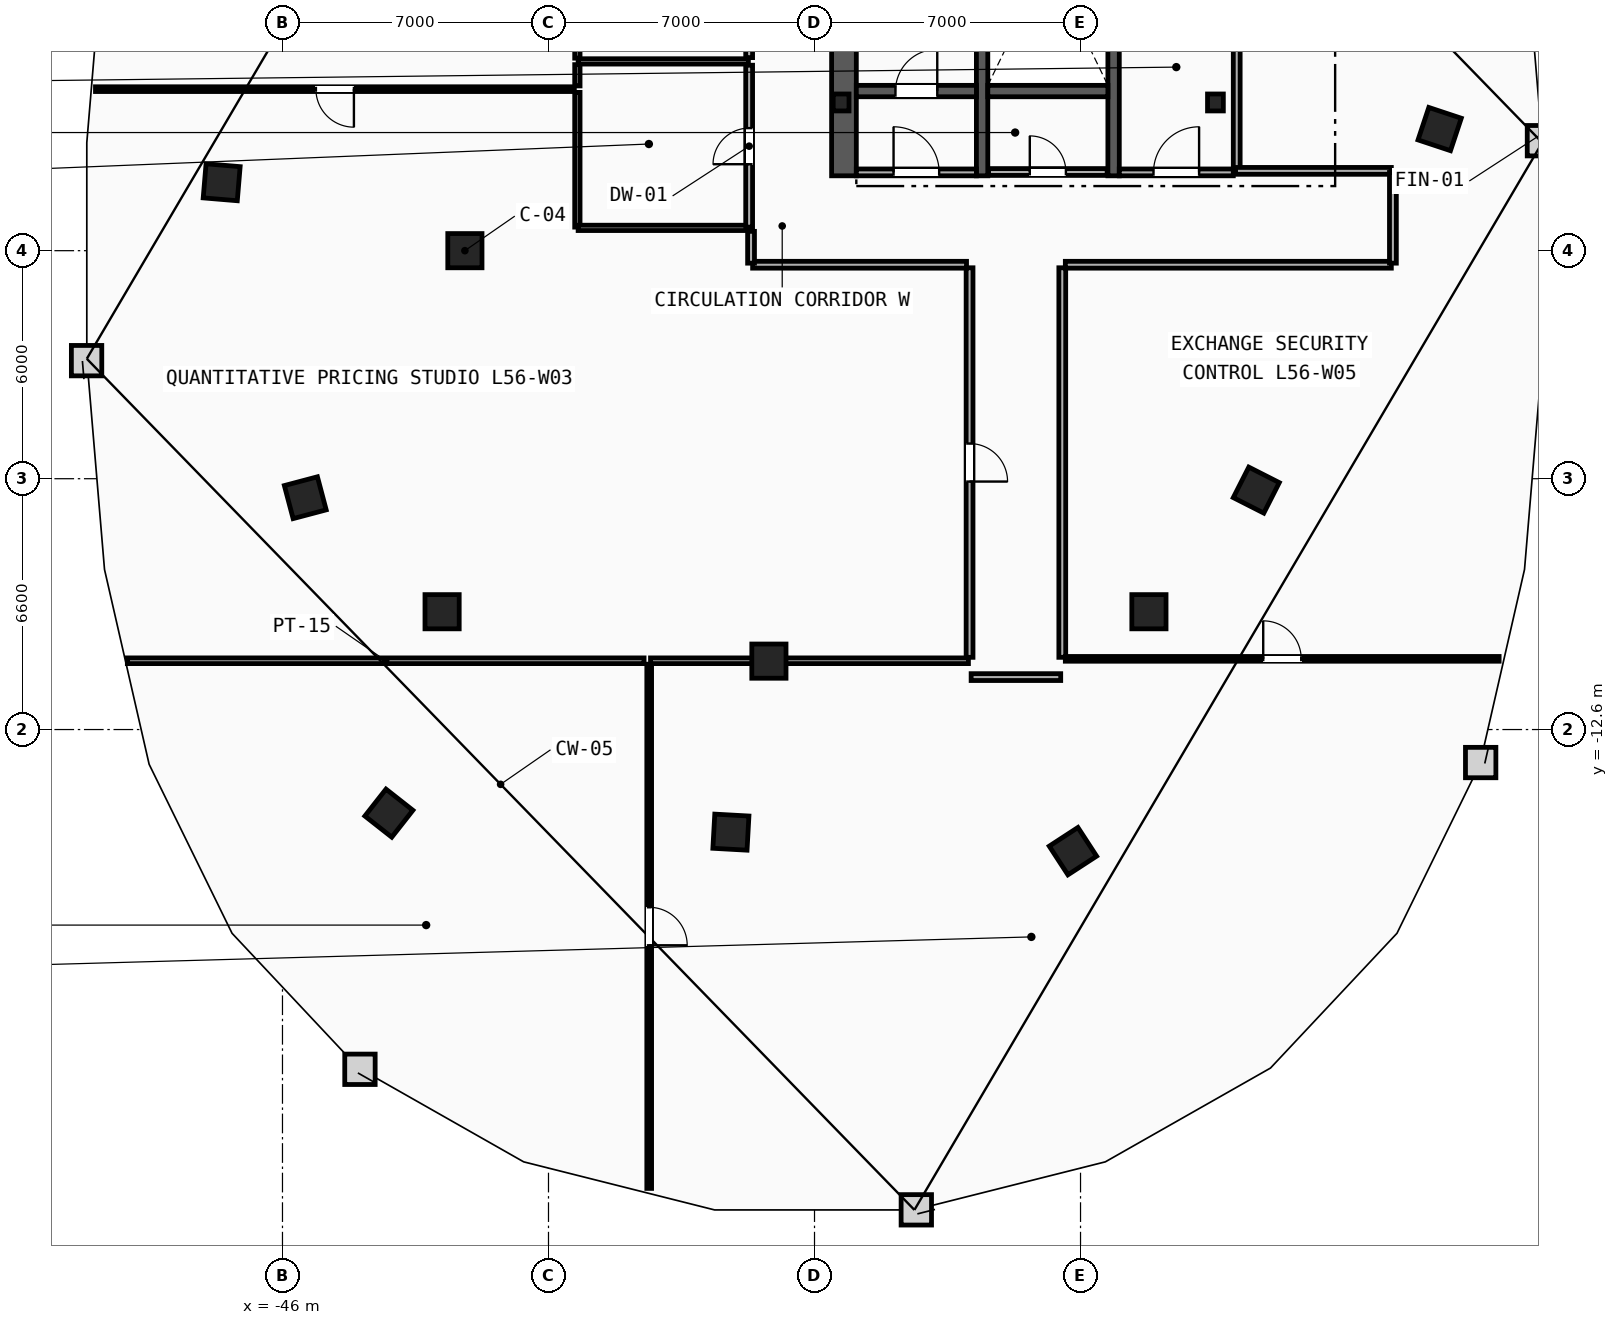
"""IFC4 building model, lengths in metres.
Left out: names, types, materials, properties, quantities, classifications, styles, units other than length and angle.
Written with IfcOpenShell. Run it as: python <this file> out.ifc"""

import sys

from ifc_helpers import new_model, si_unit, direction, frame, frame_2d, origin, origin_2d, place, context, subcontext, project, spatial, rectangle, i_section, extrude, element, fill, save


model = new_model("IFC4")
c1 = context("Model", 3, precision=1e-05, world=origin(), true_north=direction((0.0, 1.0)))
c2 = subcontext(c1, "Body", "Model", "MODEL_VIEW")
j1 = project(units=[si_unit("LENGTHUNIT", "METRE"), si_unit("PLANEANGLEUNIT", "RADIAN")], contexts=[c1])
p1 = place(None, origin())
s1 = spatial("IfcSite", under=j1, at=p1, CompositionType="ELEMENT")
p2 = place(p1, origin())
s2 = spatial("IfcBuilding", under=s1, at=p2, CompositionType="ELEMENT")
p3 = place(p2, frame((0.0, 0.0, 213.4)))
s3 = spatial("IfcBuildingStorey", under=s2, at=p3, CompositionType="ELEMENT", Elevation=213.4)
for number, where, z_axis, x_axis in (
    (1, (-31.3, 3.9, 0.0), (0.0, 0.0, 1.0), (1.0, 0.0, 0.0)),
    (2, (-21.45, 3.9, 0.0), (0.0, 0.0, 1.0), (1.0, 0.0, 0.0)),
):
    element("IfcColumn", number, at=place(p3, frame(where, z_axis=z_axis, x_axis=x_axis)), inside=s3, PredefinedType="COLUMN", context=c2, shape_type="SweptSolid", body=[
        extrude(i_section(OverallWidth=0.416, OverallDepth=0.446, WebThickness=0.039, FlangeThickness=0.063, FilletRadius=0.018, at=origin_2d()), origin(), (0.0, 0.0, 1.0), 3.6),
    ])
for number, where, z_axis, x_axis in (
    (3, (-41.2, 0.0, 0.0), (0.0, 0.0, 1.0), (1.0, 0.0, 0.0)),
    (4, (-41.8, -9.5, 0.0), (0.0, 0.0, 1.0), (1.0, 0.0, 0.0)),
    (5, (-33.2, -10.8, 0.0), (0.0, 0.0, 1.0), (1.0, 0.0, 0.0)),
    (6, (-23.2, -9.5, 0.0), (0.0, 0.0, 1.0), (1.0, 0.0, 0.0)),
    (7, (-15.55, 3.2, 0.0), (0.0, 0.0, 1.0), (0.315, 0.949, 0.0)),
    (8, (-47.6, 1.8, 0.0), (0.0, 0.0, 1.0), (-0.084, -0.997, 0.0)),
    (9, (-45.4, -6.5, 0.0), (0.0, 0.0, 1.0), (0.256, -0.967, 0.0)),
    (10, (-43.2, -14.8, 0.0), (0.0, 0.0, 1.0), (0.786, -0.618, 0.0)),
    (11, (-34.2, -15.3, 0.0), (0.0, 0.0, 1.0), (0.998, -0.055, 0.0)),
    (12, (-25.2, -15.8, 0.0), (0.0, 0.0, 1.0), (0.838, 0.546, 0.0)),
    (13, (-20.375, -6.3, 0.0), (0.0, 0.0, 1.0), (0.453, 0.892, 0.0)),
):
    element("IfcColumn", number, at=place(p3, frame(where, z_axis=z_axis, x_axis=x_axis)), inside=s3, PredefinedType="COLUMN", context=c2, shape_type="SweptSolid", body=[
        extrude(rectangle(XDim=0.9, YDim=0.9, at=origin_2d()), origin(), (0.0, 0.0, 1.0), 3.6),
    ])
p4 = place(p3, frame((-31.225, 1.97, 0.0), z_axis=(0.0, 0.0, 1.0), x_axis=(0.0, 1.0, 0.0)))
e14 = element("IfcWall", 14, at=p4, inside=s3, PredefinedType="SHEAR", context=c2, shape_type="SweptSolid", body=[
    extrude(rectangle(XDim=13.33, YDim=0.65, at=frame_2d((6.665, 0.0))), origin(), (0.0, 0.0, 1.0), 3.34),
])
for number, where, z_axis, x_axis in (
    (15, (-27.59, 1.97, 0.0), (0.0, 0.0, 1.0), (0.0, 1.0, 0.0)),
    (16, (-24.13, 1.97, 0.0), (0.0, 0.0, 1.0), (0.0, 1.0, 0.0)),
):
    element("IfcWall", number, at=place(p3, frame(where, z_axis=z_axis, x_axis=x_axis)), inside=s3, PredefinedType="SHEAR", context=c2, shape_type="SweptSolid", body=[
        extrude(rectangle(XDim=10.68, YDim=0.3, at=frame_2d((5.34, 0.0))), origin(), (0.0, 0.0, 1.0), 3.34),
    ])
p5 = place(p3, frame((-30.9, 4.2, 0.0), z_axis=(0.0, 0.0, 1.0), x_axis=(1.0, 0.0, 0.0)))
e17 = element("IfcWall", 17, at=p5, inside=s3, PredefinedType="SHEAR", context=c2, shape_type="SweptSolid", body=[
    extrude(rectangle(XDim=3.16, YDim=0.3, at=frame_2d((1.58, 0.0))), origin(), (0.0, 0.0, 1.0), 3.34),
])
p6 = place(p5, frame((1.03, 0.0, 0.0)))
e18 = element("IfcOpeningElement", 18, at=p6, cuts=e17, PredefinedType="OPENING", context=c2, shape_type="SweptSolid", body=[
    extrude(rectangle(XDim=1.1, YDim=2.15, at=frame_2d((0.55, 1.075))), frame((0.0, 0.16, 0.0), z_axis=(0.0, -1.0, 0.0), x_axis=(1.0, 0.0, 0.0)), (0.0, 0.0, 1.0), 0.32),
])
p7 = place(p3, frame((-27.44, 4.2, 0.0), z_axis=(0.0, 0.0, 1.0), x_axis=(1.0, 0.0, 0.0)))
e19 = element("IfcWall", 19, at=p7, inside=s3, PredefinedType="SHEAR", context=c2, shape_type="SweptSolid", body=[
    extrude(rectangle(XDim=3.16, YDim=0.3, at=frame_2d((1.58, 0.0))), origin(), (0.0, 0.0, 1.0), 3.34),
])
p8 = place(p3, frame((-20.89, 2.15, 0.0), z_axis=(0.0, 0.0, 1.0), x_axis=(0.0, 1.0, 0.0)))
e20 = element("IfcWall", 20, at=p8, inside=s3, PredefinedType="PARTITIONING", context=c2, shape_type="SweptSolid", body=[
    extrude(rectangle(XDim=5.3, YDim=0.18, at=frame_2d((2.65, 0.0))), origin(), (0.0, 0.0, 1.0), 3.34),
])
p9 = place(p3, frame((-23.98, 2.06, 0.0), z_axis=(0.0, 0.0, 1.0), x_axis=(1.0, 0.0, 0.0)))
e21 = element("IfcWall", 21, at=p9, inside=s3, PredefinedType="PARTITIONING", context=c2, shape_type="SweptSolid", body=[
    extrude(rectangle(XDim=3.0, YDim=0.18, at=frame_2d((1.5, 0.0))), origin(), (0.0, 0.0, 1.0), 3.34),
])
p10 = place(p9, frame((0.9, 0.0, 0.0)))
e22 = element("IfcOpeningElement", 22, at=p10, cuts=e21, PredefinedType="OPENING", context=c2, shape_type="SweptSolid", body=[
    extrude(rectangle(XDim=1.2, YDim=2.15, at=frame_2d((0.6, 1.075))), frame((0.0, 0.1, 0.0), z_axis=(0.0, -1.0, 0.0), x_axis=(1.0, 0.0, 0.0)), (0.0, 0.0, 1.0), 0.2),
])
p11 = place(p3, frame((-30.9, 2.06, 0.0), z_axis=(0.0, 0.0, 1.0), x_axis=(1.0, 0.0, 0.0)))
e23 = element("IfcWall", 23, at=p11, inside=s3, PredefinedType="PARTITIONING", context=c2, shape_type="SweptSolid", body=[
    extrude(rectangle(XDim=3.16, YDim=0.18, at=frame_2d((1.58, 0.0))), origin(), (0.0, 0.0, 1.0), 3.34),
])
p12 = place(p11, frame((0.98, 0.0, 0.0)))
e24 = element("IfcOpeningElement", 24, at=p12, cuts=e23, PredefinedType="OPENING", context=c2, shape_type="SweptSolid", body=[
    extrude(rectangle(XDim=1.2, YDim=2.15, at=frame_2d((0.6, 1.075))), frame((0.0, 0.1, 0.0), z_axis=(0.0, -1.0, 0.0), x_axis=(1.0, 0.0, 0.0)), (0.0, 0.0, 1.0), 0.2),
])
p13 = place(p3, frame((-27.42, 2.07, 0.0), z_axis=(0.0, 0.0, 1.0), x_axis=(1.0, 0.0, 0.0)))
e25 = element("IfcWall", 25, at=p13, inside=s3, PredefinedType="PARTITIONING", context=c2, shape_type="SweptSolid", body=[
    extrude(rectangle(XDim=3.12, YDim=0.18, at=frame_2d((1.56, 0.0))), origin(), (0.0, 0.0, 1.0), 3.34),
])
p14 = place(p13, frame((1.085, 0.0, 0.0)))
e26 = element("IfcOpeningElement", 26, at=p14, cuts=e25, PredefinedType="OPENING", context=c2, shape_type="SweptSolid", body=[
    extrude(rectangle(XDim=0.95, YDim=2.1, at=frame_2d((0.475, 1.05))), frame((0.0, 0.1, 0.0), z_axis=(0.0, -1.0, 0.0), x_axis=(1.0, 0.0, 0.0)), (0.0, 0.0, 1.0), 0.2),
])
p15 = place(p3, frame((-38.24, 0.62, 0.0), z_axis=(0.0, 0.0, 1.0), x_axis=(0.0, 1.0, 0.0)))
e27 = element("IfcWall", 27, at=p15, inside=s3, PredefinedType="PARTITIONING", context=c2, shape_type="SweptSolid", body=[
    extrude(rectangle(XDim=3.545, YDim=0.14, at=frame_2d((1.772, 0.0))), origin(), (0.0, 0.0, 1.0), 3.34),
])
p16 = place(p3, frame((-38.24, 4.335, 0.0), z_axis=(0.0, 0.0, 1.0), x_axis=(0.0, 1.0, 0.0)))
e28 = element("IfcWall", 28, at=p16, inside=s3, PredefinedType="PARTITIONING", context=c2, shape_type="SweptSolid", body=[
    extrude(rectangle(XDim=0.56, YDim=0.14, at=frame_2d((0.28, 0.0))), origin(), (0.0, 0.0, 1.0), 3.34),
])
p17 = place(p3, frame((-38.24, 5.065, 0.0), z_axis=(0.0, 0.0, 1.0), x_axis=(0.0, 1.0, 0.0)))
e29 = element("IfcWall", 29, at=p17, inside=s3, PredefinedType="PARTITIONING", context=c2, shape_type="SweptSolid", body=[
    extrude(rectangle(XDim=4.175, YDim=0.14, at=frame_2d((2.087, 0.0))), origin(), (0.0, 0.0, 1.0), 3.34),
])
for number, where, z_axis, x_axis in (
    (30, (-38.22, 0.6, 0.0), (0.0, 0.0, 1.0), (1.0, 0.0, 0.0)),
    (31, (-38.22, 4.98, 0.0), (0.0, 0.0, 1.0), (1.0, 0.0, 0.0)),
):
    element("IfcWall", number, at=place(p3, frame(where, z_axis=z_axis, x_axis=x_axis)), inside=s3, PredefinedType="PARTITIONING", context=c2, shape_type="SweptSolid", body=[
        extrude(rectangle(XDim=4.48, YDim=0.14, at=frame_2d((2.24, 0.0))), origin(), (0.0, 0.0, 1.0), 3.34),
    ])
p18 = place(p3, frame((-33.72, 0.62, 0.0), z_axis=(0.0, 0.0, 1.0), x_axis=(0.0, 1.0, 0.0)))
e32 = element("IfcWall", 32, at=p18, inside=s3, PredefinedType="PARTITIONING", context=c2, shape_type="SweptSolid", body=[
    extrude(rectangle(XDim=4.26, YDim=0.18, at=frame_2d((2.13, 0.0))), origin(), (0.0, 0.0, 1.0), 3.34),
])
p19 = place(p18, frame((1.655, 0.0, 0.0)))
e33 = element("IfcOpeningElement", 33, at=p19, cuts=e32, PredefinedType="OPENING", context=c2, shape_type="SweptSolid", body=[
    extrude(rectangle(XDim=0.95, YDim=2.1, at=frame_2d((0.475, 1.05))), frame((0.0, 0.1, 0.0), z_axis=(0.0, -1.0, 0.0), x_axis=(1.0, 0.0, 0.0)), (0.0, 0.0, 1.0), 0.2),
])
p20 = place(p3, frame((-33.72, 5.08, 0.0), z_axis=(0.0, 0.0, 1.0), x_axis=(0.0, 1.0, 0.0)))
e34 = element("IfcWall", 34, at=p20, inside=s3, PredefinedType="PARTITIONING", context=c2, shape_type="SweptSolid", body=[
    extrude(rectangle(XDim=4.16, YDim=0.18, at=frame_2d((2.08, 0.0))), origin(), (0.0, 0.0, 1.0), 3.34),
])
p21 = place(p20, frame((1.58, 0.0, 0.0)))
e35 = element("IfcOpeningElement", 35, at=p21, cuts=e34, PredefinedType="OPENING", context=c2, shape_type="SweptSolid", body=[
    extrude(rectangle(XDim=1.0, YDim=2.15, at=frame_2d((0.5, 1.075))), frame((0.0, 0.1, 0.0), z_axis=(0.0, -1.0, 0.0), x_axis=(1.0, 0.0, 0.0)), (0.0, 0.0, 1.0), 0.2),
])
p22 = place(p3, frame((-50.082, -10.79, 0.0), z_axis=(0.0, 0.0, 1.0), x_axis=(1.0, 0.0, 0.0)))
e36 = element("IfcWall", 36, at=p22, inside=s3, PredefinedType="PARTITIONING", context=c2, shape_type="SweptSolid", body=[
    extrude(rectangle(XDim=13.597, YDim=0.15, at=frame_2d((6.799, 0.0))), origin(), (0.0, 0.0, 1.0), 3.34),
])
p23 = place(p3, frame((-36.315, -10.79, 0.0), z_axis=(0.0, 0.0, 1.0), x_axis=(1.0, 0.0, 0.0)))
e37 = element("IfcWall", 37, at=p23, inside=s3, PredefinedType="PARTITIONING", context=c2, shape_type="SweptSolid", body=[
    extrude(rectangle(XDim=8.365, YDim=0.15, at=frame_2d((4.183, 0.0))), origin(), (0.0, 0.0, 1.0), 2.724),
])
p24 = place(p3, frame((-27.878, -11.22, 0.0), z_axis=(0.0, 0.0, 1.0), x_axis=(1.0, 0.0, 0.0)))
e38 = element("IfcWall", 38, at=p24, inside=s3, PredefinedType="PARTITIONING", context=c2, shape_type="SweptSolid", body=[
    extrude(rectangle(XDim=2.357, YDim=0.18, at=frame_2d((1.178, 0.0))), origin(), (0.0, 0.0, 1.0), 3.34),
])
p25 = place(p3, frame((-27.92, -0.45, 0.0), z_axis=(0.0, 0.0, 1.0), x_axis=(0.0, -1.0, 0.0)))
e39 = element("IfcWall", 39, at=p25, inside=s3, PredefinedType="PARTITIONING", context=c2, shape_type="SweptSolid", body=[
    extrude(rectangle(XDim=10.25, YDim=0.18, at=frame_2d((5.125, 0.0))), origin(), (0.0, 0.0, 1.0), 3.34),
])
p26 = place(p25, frame((4.625, 0.0, 0.0)))
e40 = element("IfcOpeningElement", 40, at=p26, cuts=e39, PredefinedType="OPENING", context=c2, shape_type="SweptSolid", body=[
    extrude(rectangle(XDim=1.0, YDim=2.15, at=frame_2d((0.5, 1.075))), frame((0.0, 0.1, 0.0), z_axis=(0.0, -1.0, 0.0), x_axis=(1.0, 0.0, 0.0)), (0.0, 0.0, 1.0), 0.2),
])
p27 = place(p3, frame((-33.628, -0.37, 0.0), z_axis=(0.0, 0.0, 1.0), x_axis=(1.0, 0.0, 0.0)))
e41 = element("IfcWall", 41, at=p27, inside=s3, PredefinedType="PARTITIONING", context=c2, shape_type="SweptSolid", body=[
    extrude(rectangle(XDim=5.628, YDim=0.18, at=frame_2d((2.814, 0.0))), origin(), (0.0, 0.0, 1.0), 3.34),
])
p28 = place(p3, frame((-33.67, 0.509, 0.0), z_axis=(0.0, 0.0, 1.0), x_axis=(0.0, -1.0, 0.0)))
e42 = element("IfcWall", 42, at=p28, inside=s3, PredefinedType="PARTITIONING", context=c2, shape_type="SweptSolid", body=[
    extrude(rectangle(XDim=0.837, YDim=0.18, at=frame_2d((0.418, 0.0))), origin(), (0.0, 0.0, 1.0), 3.34),
])
p29 = place(p3, frame((-25.48, -10.7, 0.0), z_axis=(0.0, 0.0, 1.0), x_axis=(0.0, 1.0, 0.0)))
e43 = element("IfcWall", 43, at=p29, inside=s3, PredefinedType="PARTITIONING", context=c2, shape_type="SweptSolid", body=[
    extrude(rectangle(XDim=10.25, YDim=0.18, at=frame_2d((5.125, 0.0))), origin(), (0.0, 0.0, 1.0), 3.34),
])
p30 = place(p3, frame((-25.4, -0.37, 0.0), z_axis=(0.0, 0.0, 1.0), x_axis=(1.0, 0.0, 0.0)))
e44 = element("IfcWall", 44, at=p30, inside=s3, PredefinedType="PARTITIONING", context=c2, shape_type="SweptSolid", body=[
    extrude(rectangle(XDim=8.578, YDim=0.18, at=frame_2d((4.289, 0.0))), origin(), (0.0, 0.0, 1.0), 3.34),
])
p31 = place(p3, frame((-16.822, 2.1, 0.0), z_axis=(0.0, 0.0, 1.0), x_axis=(-1.0, 0.0, 0.0)))
e45 = element("IfcWall", 45, at=p31, inside=s3, PredefinedType="PARTITIONING", context=c2, shape_type="SweptSolid", body=[
    extrude(rectangle(XDim=4.098, YDim=0.18, at=frame_2d((2.049, 0.0))), origin(), (0.0, 0.0, 1.0), 3.34),
])
p32 = place(p3, frame((-16.78, -0.329, 0.0), z_axis=(0.0, 0.0, 1.0), x_axis=(0.0, 1.0, 0.0)))
e46 = element("IfcWall", 46, at=p32, inside=s3, PredefinedType="PARTITIONING", context=c2, shape_type="SweptSolid", body=[
    extrude(rectangle(XDim=2.387, YDim=0.18, at=frame_2d((1.194, 0.0))), origin(), (0.0, 0.0, 1.0), 3.34),
])
p33 = place(p3, frame((-25.4, -10.74, 0.0), z_axis=(0.0, 0.0, 1.0), x_axis=(1.0, 0.0, 0.0)))
e47 = element("IfcWall", 47, at=p33, inside=s3, PredefinedType="PARTITIONING", context=c2, shape_type="SweptSolid", body=[
    extrude(rectangle(XDim=11.415, YDim=0.125, at=frame_2d((5.708, 0.0))), origin(), (0.0, 0.0, 1.0), 3.34),
])
p34 = place(p33, frame((5.208, 0.0, 0.0)))
e48 = element("IfcOpeningElement", 48, at=p34, cuts=e47, PredefinedType="OPENING", context=c2, shape_type="SweptSolid", body=[
    extrude(rectangle(XDim=1.0, YDim=2.15, at=frame_2d((0.5, 1.075))), frame((0.0, 0.073, 0.0), z_axis=(0.0, -1.0, 0.0), x_axis=(1.0, 0.0, 0.0)), (0.0, 0.0, 1.0), 0.145),
])
p35 = place(p3, frame((-36.35, -10.88, 0.0), z_axis=(0.0, 0.0, 1.0), x_axis=(0.0, -1.0, 0.0)))
e49 = element("IfcWall", 49, at=p35, inside=s3, PredefinedType="PARTITIONING", context=c2, shape_type="SweptSolid", body=[
    extrude(rectangle(XDim=13.794, YDim=0.125, at=frame_2d((6.897, 0.0))), origin(), (0.0, 0.0, 1.0), 3.34),
])
p36 = place(p35, frame((6.397, 0.0, 0.0)))
e50 = element("IfcOpeningElement", 50, at=p36, cuts=e49, PredefinedType="OPENING", context=c2, shape_type="SweptSolid", body=[
    extrude(rectangle(XDim=1.0, YDim=2.15, at=frame_2d((0.5, 1.075))), frame((0.0, 0.073, 0.0), z_axis=(0.0, -1.0, 0.0), x_axis=(1.0, 0.0, 0.0)), (0.0, 0.0, 1.0), 0.145),
])
p37 = place(p3, frame((-38.32, 4.25, 0.0), z_axis=(0.0, 0.0, 1.0), x_axis=(-1.0, 0.0, 0.0)))
e51 = element("IfcWall", 51, at=p37, inside=s3, PredefinedType="PARTITIONING", context=c2, shape_type="SweptSolid", body=[
    extrude(rectangle(XDim=12.6, YDim=0.125, at=frame_2d((6.3, 0.0))), origin(), (0.0, 0.0, 1.0), 3.34),
])
p38 = place(p37, frame((5.8, 0.0, 0.0)))
e52 = element("IfcOpeningElement", 52, at=p38, cuts=e51, PredefinedType="OPENING", context=c2, shape_type="SweptSolid", body=[
    extrude(rectangle(XDim=1.0, YDim=2.15, at=frame_2d((0.5, 1.075))), frame((0.0, 0.073, 0.0), z_axis=(0.0, -1.0, 0.0), x_axis=(1.0, 0.0, 0.0)), (0.0, 0.0, 1.0), 0.145),
])
p39 = place(p6, origin())
e53 = element("IfcDoor", 53, at=p39, inside=s3, OperationType="SINGLE_SWING_RIGHT", PredefinedType="DOOR", context=c2, shape_type="SweptSolid", body=[
    extrude(rectangle(XDim=1.1, YDim=2.15, at=frame_2d((0.55, 1.075))), frame((0.0, 0.025, 0.0), z_axis=(0.0, -1.0, 0.0), x_axis=(1.0, 0.0, 0.0)), (0.0, 0.0, 1.0), 0.05),
])
fill(e18, e53)
p40 = place(p10, origin())
e54 = element("IfcDoor", 54, at=p40, inside=s3, OperationType="SINGLE_SWING_RIGHT", PredefinedType="DOOR", context=c2, shape_type="SweptSolid", body=[
    extrude(rectangle(XDim=1.2, YDim=2.15, at=frame_2d((0.6, 1.075))), frame((0.0, 0.025, 0.0), z_axis=(0.0, -1.0, 0.0), x_axis=(1.0, 0.0, 0.0)), (0.0, 0.0, 1.0), 0.05),
])
fill(e22, e54)
p41 = place(p12, origin())
e55 = element("IfcDoor", 55, at=p41, inside=s3, OperationType="SINGLE_SWING_LEFT", PredefinedType="DOOR", context=c2, shape_type="SweptSolid", body=[
    extrude(rectangle(XDim=1.2, YDim=2.15, at=frame_2d((0.6, 1.075))), frame((0.0, 0.025, 0.0), z_axis=(0.0, -1.0, 0.0), x_axis=(1.0, 0.0, 0.0)), (0.0, 0.0, 1.0), 0.05),
])
fill(e24, e55)
p42 = place(p36, origin())
e56 = element("IfcDoor", 56, at=p42, inside=s3, OperationType="SINGLE_SWING_RIGHT", PredefinedType="DOOR", context=c2, shape_type="SweptSolid", body=[
    extrude(rectangle(XDim=1.0, YDim=2.15, at=frame_2d((0.5, 1.075))), frame((0.0, 0.025, 0.0), z_axis=(0.0, -1.0, 0.0), x_axis=(1.0, 0.0, 0.0)), (0.0, 0.0, 1.0), 0.05),
])
fill(e50, e56)
p43 = place(p38, origin())
e57 = element("IfcDoor", 57, at=p43, inside=s3, OperationType="SINGLE_SWING_LEFT", PredefinedType="DOOR", context=c2, shape_type="SweptSolid", body=[
    extrude(rectangle(XDim=1.0, YDim=2.15, at=frame_2d((0.5, 1.075))), frame((0.0, 0.025, 0.0), z_axis=(0.0, -1.0, 0.0), x_axis=(1.0, 0.0, 0.0)), (0.0, 0.0, 1.0), 0.05),
])
fill(e52, e57)
p44 = place(p34, origin())
e58 = element("IfcDoor", 58, at=p44, inside=s3, OperationType="SINGLE_SWING_LEFT", PredefinedType="DOOR", context=c2, shape_type="SweptSolid", body=[
    extrude(rectangle(XDim=1.0, YDim=2.15, at=frame_2d((0.5, 1.075))), frame((0.0, 0.025, 0.0), z_axis=(0.0, -1.0, 0.0), x_axis=(1.0, 0.0, 0.0)), (0.0, 0.0, 1.0), 0.05),
])
fill(e48, e58)
p45 = place(p26, origin())
e59 = element("IfcDoor", 59, at=p45, inside=s3, OperationType="SINGLE_SWING_RIGHT", PredefinedType="DOOR", context=c2, shape_type="SweptSolid", body=[
    extrude(rectangle(XDim=1.0, YDim=2.15, at=frame_2d((0.5, 1.075))), frame((0.0, 0.025, 0.0), z_axis=(0.0, -1.0, 0.0), x_axis=(1.0, 0.0, 0.0)), (0.0, 0.0, 1.0), 0.05),
])
fill(e40, e59)
p46 = place(p19, origin())
e60 = element("IfcDoor", 60, at=p46, inside=s3, OperationType="SINGLE_SWING_LEFT", PredefinedType="DOOR", context=c2, shape_type="SweptSolid", body=[
    extrude(rectangle(XDim=0.95, YDim=2.1, at=frame_2d((0.475, 1.05))), frame((0.0, 0.025, 0.0), z_axis=(0.0, -1.0, 0.0), x_axis=(1.0, 0.0, 0.0)), (0.0, 0.0, 1.0), 0.05),
])
fill(e33, e60)
p47 = place(p14, origin())
e61 = element("IfcDoor", 61, at=p47, inside=s3, OperationType="SINGLE_SWING_LEFT", PredefinedType="DOOR", context=c2, shape_type="SweptSolid", body=[
    extrude(rectangle(XDim=0.95, YDim=2.1, at=frame_2d((0.475, 1.05))), frame((0.0, 0.025, 0.0), z_axis=(0.0, -1.0, 0.0), x_axis=(1.0, 0.0, 0.0)), (0.0, 0.0, 1.0), 0.05),
])
fill(e26, e61)
save(model, sys.argv[1])
